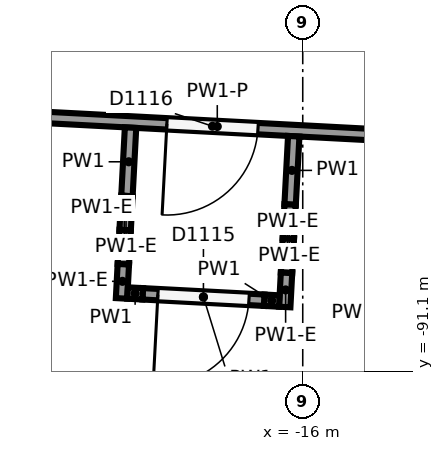
"""IFC4 building model, lengths in metres.
Left out: names, types, materials, properties, quantities, classifications, styles, units other than length and angle.
Written with IfcOpenShell. Run it as: python <this file> out.ifc"""

import sys

from ifc_helpers import new_model, si_unit, direction, frame, frame_2d, origin, place, context, subcontext, project, spatial, rectangle, extrude, element, fill, save


model = new_model("IFC4")
c1 = context("Model", 3, precision=1e-05, world=origin(), true_north=direction((0.0, 1.0)))
c2 = subcontext(c1, "Body", "Model", "MODEL_VIEW")
j1 = project(units=[si_unit("LENGTHUNIT", "METRE"), si_unit("PLANEANGLEUNIT", "RADIAN")], contexts=[c1])
p1 = place(None, origin())
s1 = spatial("IfcSite", under=j1, at=p1, CompositionType="ELEMENT")
p2 = place(p1, origin())
s2 = spatial("IfcBuilding", under=s1, at=p2, CompositionType="ELEMENT")
p3 = place(p2, frame((0.0, 0.0, 12.0)))
s3 = spatial("IfcBuildingStorey", under=s2, at=p3, CompositionType="ELEMENT", Elevation=12.0)
p4 = place(p3, frame((-14.642, -88.012, 0.0), z_axis=(0.0, 0.0, 1.0), x_axis=(-0.998613893233, 0.052633565738, 0.0)))
e1 = element("IfcWall", 1, at=p4, inside=s3, PredefinedType="PARTITIONING", context=c2, shape_type="SweptSolid", body=[
    extrude(rectangle(XDim=4.972, YDim=0.15, at=frame_2d((2.486, 0.0))), origin(), (0.0, 0.0, 1.0), 3.907),
])
p5 = place(p4, frame((1.95, 0.0, 0.0)))
e2 = element("IfcOpeningElement", 2, at=p5, cuts=e1, PredefinedType="OPENING", context=c2, shape_type="SweptSolid", body=[
    extrude(rectangle(XDim=1.2, YDim=2.1, at=frame_2d((0.6, 1.05))), frame((0.0, 0.085, 0.0), z_axis=(0.0, -1.0, 0.0), x_axis=(1.0, 0.0, 0.0)), (0.0, 0.0, 1.0), 0.17),
])
p6 = place(p3, frame((-16.119, -88.009, 0.0), z_axis=(0.0, 0.0, 1.0), x_axis=(-0.052630027564, -0.998614079712, 0.0)))
e3 = element("IfcWall", 3, at=p6, inside=s3, PredefinedType="PARTITIONING", context=c2, shape_type="SweptSolid", body=[
    extrude(rectangle(XDim=0.9, YDim=0.15, at=frame_2d((0.45, 0.0))), origin(), (0.0, 0.0, 1.0), 5.65),
])
p7 = place(p3, frame((-16.166, -88.908, 0.0), z_axis=(0.0, 0.0, 1.0), x_axis=(-0.052615773272, -0.998614830855, 0.0)))
e4 = element("IfcWall", 4, at=p7, inside=s3, PredefinedType="PARTITIONING", context=c2, shape_type="SweptSolid", body=[
    extrude(rectangle(XDim=0.45, YDim=0.15, at=frame_2d((0.225, 0.0))), origin(), (0.0, 0.0, 1.0), 4.35),
])
p8 = place(p3, frame((-16.19, -89.357, 0.0), z_axis=(0.0, 0.0, 1.0), x_axis=(-0.052644289572, -0.998613327958, 0.0)))
e5 = element("IfcWall", 5, at=p8, inside=s3, PredefinedType="PARTITIONING", context=c2, shape_type="SweptSolid", body=[
    extrude(rectangle(XDim=0.45, YDim=0.15, at=frame_2d((0.225, 0.0))), origin(), (0.0, 0.0, 1.0), 4.35),
])
p9 = place(p3, frame((-16.213, -89.806, 0.0), z_axis=(0.0, 0.0, 1.0), x_axis=(-0.052615773272, -0.998614830855, 0.0)))
e6 = element("IfcWall", 6, at=p9, inside=s3, PredefinedType="PARTITIONING", context=c2, shape_type="SweptSolid", body=[
    extrude(rectangle(XDim=0.45, YDim=0.15, at=frame_2d((0.225, 0.0))), origin(), (0.0, 0.0, 1.0), 4.35),
])
p10 = place(p3, frame((-18.266, -87.896, 0.0), z_axis=(0.0, 0.0, 1.0), x_axis=(-0.052615773272, -0.998614830855, 0.0)))
e7 = element("IfcWall", 7, at=p10, inside=s3, PredefinedType="PARTITIONING", context=c2, shape_type="SweptSolid", body=[
    extrude(rectangle(XDim=0.9, YDim=0.15, at=frame_2d((0.45, 0.0))), origin(), (0.0, 0.0, 1.0), 5.65),
])
p11 = place(p3, frame((-18.313, -88.795, 0.0), z_axis=(0.0, 0.0, 1.0), x_axis=(-0.052644289572, -0.998613327958, 0.0)))
e8 = element("IfcWall", 8, at=p11, inside=s3, PredefinedType="PARTITIONING", context=c2, shape_type="SweptSolid", body=[
    extrude(rectangle(XDim=0.45, YDim=0.15, at=frame_2d((0.225, 0.0))), origin(), (0.0, 0.0, 1.0), 4.35),
])
p12 = place(p3, frame((-18.337, -89.244, 0.0), z_axis=(0.0, 0.0, 1.0), x_axis=(-0.052615773272, -0.998614830855, 0.0)))
e9 = element("IfcWall", 9, at=p12, inside=s3, PredefinedType="PARTITIONING", context=c2, shape_type="SweptSolid", body=[
    extrude(rectangle(XDim=0.45, YDim=0.15, at=frame_2d((0.225, 0.0))), origin(), (0.0, 0.0, 1.0), 4.35),
])
p13 = place(p3, frame((-18.36, -89.693, 0.0), z_axis=(0.0, 0.0, 1.0), x_axis=(-0.052644289572, -0.998613327958, 0.0)))
e10 = element("IfcWall", 10, at=p13, inside=s3, PredefinedType="PARTITIONING", context=c2, shape_type="SweptSolid", body=[
    extrude(rectangle(XDim=0.45, YDim=0.15, at=frame_2d((0.225, 0.0))), origin(), (0.0, 0.0, 1.0), 4.35),
])
p14 = place(p3, frame((-16.308, -90.177, 0.0), z_axis=(0.0, 0.0, 1.0), x_axis=(-0.998621199675, 0.05249475744, 0.0)))
e11 = element("IfcWall", 11, at=p14, inside=s3, PredefinedType="PARTITIONING", context=c2, shape_type="SweptSolid", body=[
    extrude(rectangle(XDim=0.2, YDim=0.15, at=frame_2d((0.1, 0.0))), origin(), (0.0, 0.0, 1.0), 5.65),
])
p15 = place(p3, frame((-16.508, -90.167, 0.0), z_axis=(0.0, 0.0, 1.0), x_axis=(-0.998613188435, 0.052646936126, 0.0)))
e12 = element("IfcWall", 12, at=p15, inside=s3, PredefinedType="PARTITIONING", context=c2, shape_type="SweptSolid", body=[
    extrude(rectangle(XDim=1.6, YDim=0.15, at=frame_2d((0.8, 0.0))), origin(), (0.0, 0.0, 1.0), 5.65),
])
p16 = place(p15, frame((0.2, 0.0, 0.0)))
e13 = element("IfcOpeningElement", 13, at=p16, cuts=e12, PredefinedType="OPENING", context=c2, shape_type="SweptSolid", body=[
    extrude(rectangle(XDim=1.2, YDim=2.1, at=frame_2d((0.6, 1.05))), frame((0.0, 0.085, 0.0), z_axis=(0.0, -1.0, 0.0), x_axis=(1.0, 0.0, 0.0)), (0.0, 0.0, 1.0), 0.17),
])
p17 = place(p3, frame((-18.105, -90.082, 0.0), z_axis=(0.0, 0.0, 1.0), x_axis=(-0.998621199675, 0.05249475744, 0.0)))
e14 = element("IfcWall", 14, at=p17, inside=s3, PredefinedType="PARTITIONING", context=c2, shape_type="SweptSolid", body=[
    extrude(rectangle(XDim=0.2, YDim=0.15, at=frame_2d((0.1, 0.0))), origin(), (0.0, 0.0, 1.0), 5.65),
])
p18 = place(p5, origin())
e15 = element("IfcDoor", 15, at=p18, inside=s3, OperationType="SINGLE_SWING_RIGHT", PredefinedType="DOOR", context=c2, shape_type="SweptSolid", body=[
    extrude(rectangle(XDim=1.2, YDim=2.1, at=frame_2d((0.6, 1.05))), frame((0.0, 0.025, 0.0), z_axis=(0.0, -1.0, 0.0), x_axis=(1.0, 0.0, 0.0)), (0.0, 0.0, 1.0), 0.05),
])
fill(e2, e15)
p19 = place(p16, origin())
e16 = element("IfcDoor", 16, at=p19, inside=s3, OperationType="SINGLE_SWING_RIGHT", PredefinedType="DOOR", context=c2, shape_type="SweptSolid", body=[
    extrude(rectangle(XDim=1.2, YDim=2.1, at=frame_2d((0.6, 1.05))), frame((0.0, 0.025, 0.0), z_axis=(0.0, -1.0, 0.0), x_axis=(1.0, 0.0, 0.0)), (0.0, 0.0, 1.0), 0.05),
])
fill(e13, e16)
save(model, sys.argv[1])
